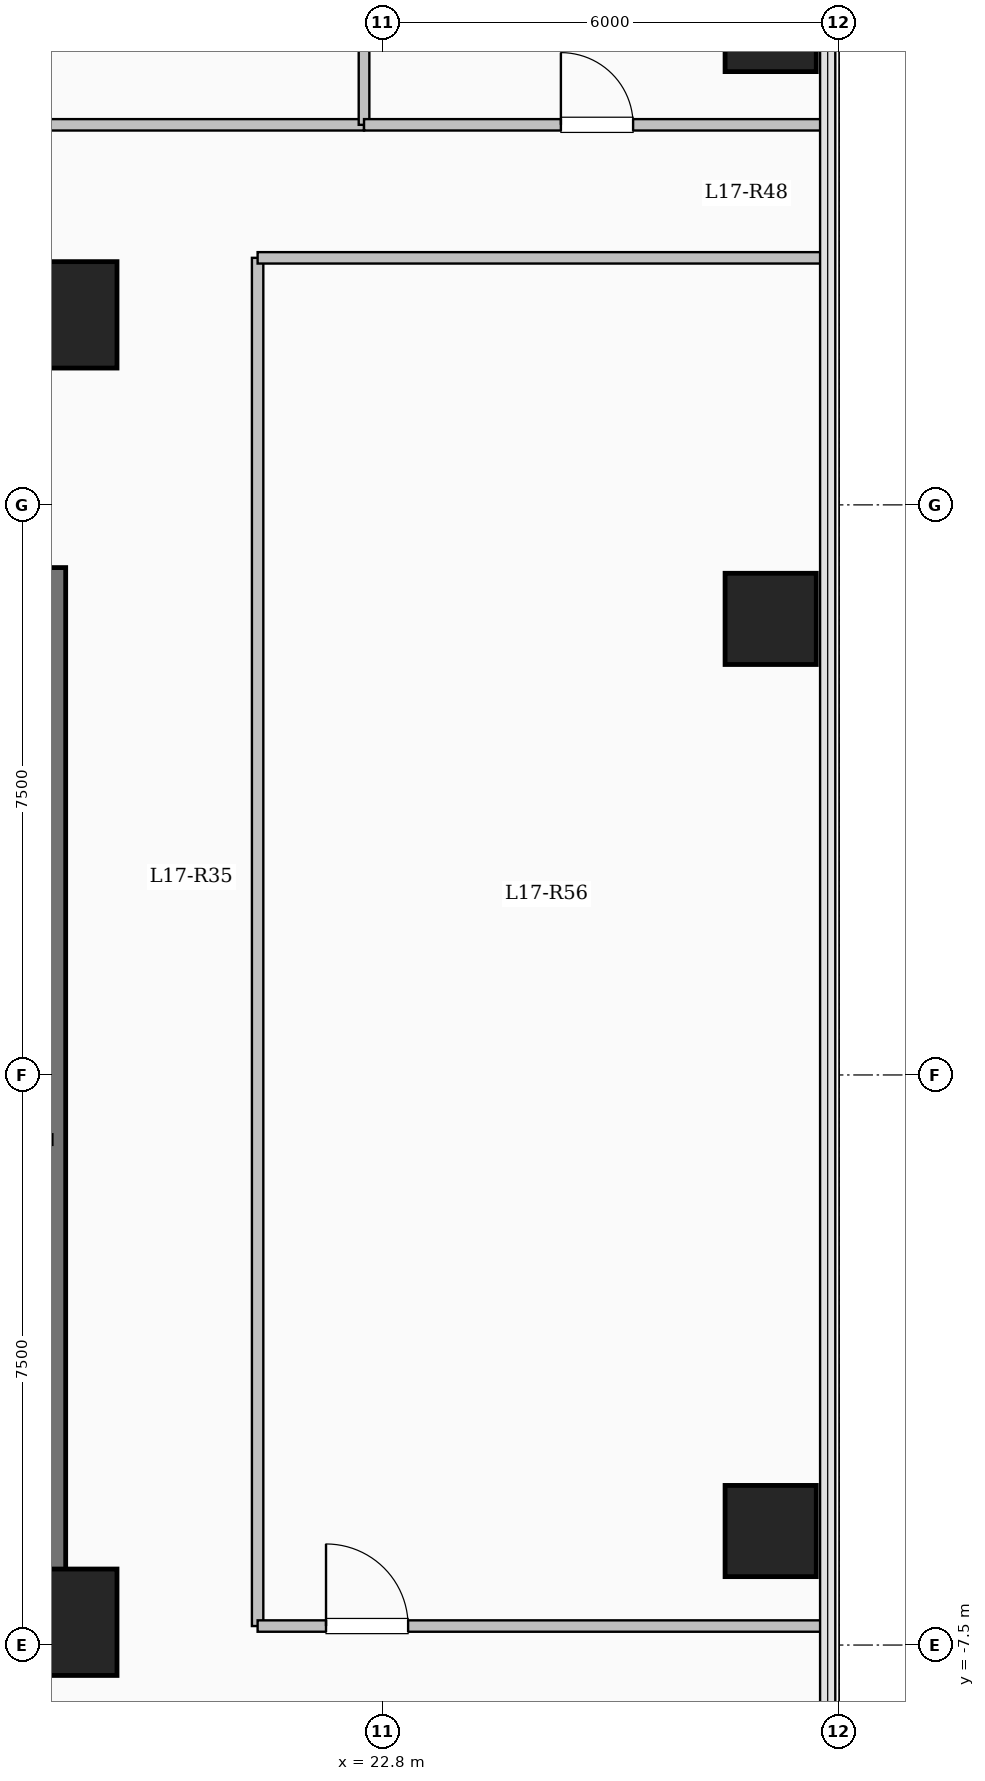
"""IFC4 building model, lengths in metres.
Left out: names, types, materials, properties, quantities, classifications, styles, units other than length and angle.
Written with IfcOpenShell. Run it as: python <this file> out.ifc"""

import sys

from ifc_helpers import new_model, si_unit, direction, frame, frame_2d, origin, origin_2d, place, context, subcontext, project, spatial, rectangle, extrude, element, fill, save


model = new_model("IFC4")
c1 = context("Model", 3, precision=1e-05, world=origin(), true_north=direction((0.0, 1.0)))
c2 = subcontext(c1, "Body", "Model", "MODEL_VIEW")
j1 = project(units=[si_unit("LENGTHUNIT", "METRE"), si_unit("PLANEANGLEUNIT", "RADIAN")], contexts=[c1])
p1 = place(None, origin())
s1 = spatial("IfcSite", under=j1, at=p1, CompositionType="ELEMENT")
p2 = place(p1, origin())
s2 = spatial("IfcBuilding", under=s1, at=p2, CompositionType="ELEMENT")
p3 = place(p2, frame((0.0, 0.0, 64.2)))
s3 = spatial("IfcBuildingStorey", under=s2, at=p3, CompositionType="ELEMENT", Elevation=64.2)
for number, where, z_axis, x_axis in (
    (1, (18.6, -7.2, 0.0), (0.0, 0.0, 1.0), (1.0, 0.0, 0.0)),
    (2, (18.6, 10.0, 0.0), (0.0, 0.0, 1.0), (1.0, 0.0, 0.0)),
):
    element("IfcColumn", number, at=place(p3, frame(where, z_axis=z_axis, x_axis=x_axis)), inside=s3, PredefinedType="COLUMN", context=c2, shape_type="SweptSolid", body=[
        extrude(rectangle(XDim=1.4, YDim=1.4, at=origin_2d()), origin(), (0.0, 0.0, 1.0), 4.5),
    ])
for number, where, z_axis, x_axis in (
    (3, (27.9, -6.0, 0.0), (0.0, 0.0, 1.0), (1.0, 0.0, 0.0)),
    (4, (27.9, 6.0, 0.0), (0.0, 0.0, 1.0), (1.0, 0.0, 0.0)),
    (5, (27.9, 13.8, 0.0), (0.0, 0.0, 1.0), (1.0, 0.0, 0.0)),
):
    element("IfcColumn", number, at=place(p3, frame(where, z_axis=z_axis, x_axis=x_axis)), inside=s3, PredefinedType="COLUMN", context=c2, shape_type="SweptSolid", body=[
        extrude(rectangle(XDim=1.2, YDim=1.2, at=origin_2d()), origin(), (0.0, 0.0, 1.0), 4.5),
    ])
p4 = place(p3, frame((18.45, -7.375, 0.0), z_axis=(0.0, 0.0, 1.0), x_axis=(0.0, 1.0, 0.0)))
e6 = element("IfcWall", 6, at=p4, inside=s3, PredefinedType="SHEAR", context=c2, shape_type="SweptSolid", body=[
    extrude(rectangle(XDim=14.05, YDim=0.35, at=frame_2d((7.025, 0.0))), origin(), (0.0, 0.0, 1.0), 4.5),
])
p5 = place(p3, frame((10.075, -7.2, 0.0), z_axis=(0.0, 0.0, 1.0), x_axis=(1.0, 0.0, 0.0)))
e7 = element("IfcWall", 7, at=p5, inside=s3, PredefinedType="SHEAR", context=c2, shape_type="SweptSolid", body=[
    extrude(rectangle(XDim=8.55, YDim=0.35, at=frame_2d((4.275, 0.0))), origin(), (0.0, 0.0, 1.0), 4.5),
])
p6 = place(p3, frame((3.85, 12.5, 0.0), z_axis=(0.0, 0.0, 1.0), x_axis=(1.0, 0.0, 0.0)))
e8 = element("IfcWall", 8, at=p6, inside=s3, PredefinedType="PARTITIONING", context=c2, shape_type="SweptSolid", body=[
    extrude(rectangle(XDim=18.7, YDim=0.15, at=frame_2d((9.35, 0.0))), origin(), (0.0, 0.0, 1.0), 4.2),
])
p7 = place(p6, frame((0.8, 0.0, 0.0)))
e9 = element("IfcOpeningElement", 9, at=p7, cuts=e8, PredefinedType="OPENING", context=c2, shape_type="SweptSolid", body=[
    extrude(rectangle(XDim=0.95, YDim=2.15, at=frame_2d((0.475, 1.075))), frame((0.0, 0.085, 0.0), z_axis=(0.0, -1.0, 0.0), x_axis=(1.0, 0.0, 0.0)), (0.0, 0.0, 1.0), 0.17),
])
p8 = place(p6, frame((3.6, 0.0, 0.0)))
e10 = element("IfcOpeningElement", 10, at=p8, cuts=e8, PredefinedType="OPENING", context=c2, shape_type="SweptSolid", body=[
    extrude(rectangle(XDim=0.95, YDim=2.15, at=frame_2d((0.475, 1.075))), frame((0.0, 0.085, 0.0), z_axis=(0.0, -1.0, 0.0), x_axis=(1.0, 0.0, 0.0)), (0.0, 0.0, 1.0), 0.17),
])
p9 = place(p6, frame((6.55, 0.0, 0.0)))
e11 = element("IfcOpeningElement", 11, at=p9, cuts=e8, PredefinedType="OPENING", context=c2, shape_type="SweptSolid", body=[
    extrude(rectangle(XDim=1.08, YDim=2.15, at=frame_2d((0.54, 1.075))), frame((0.0, 0.085, 0.0), z_axis=(0.0, -1.0, 0.0), x_axis=(1.0, 0.0, 0.0)), (0.0, 0.0, 1.0), 0.17),
])
p10 = place(p6, frame((11.317, 0.0, 0.0)))
e12 = element("IfcOpeningElement", 12, at=p10, cuts=e8, PredefinedType="OPENING", context=c2, shape_type="SweptSolid", body=[
    extrude(rectangle(XDim=1.2, YDim=2.15, at=frame_2d((0.6, 1.075))), frame((0.0, 0.085, 0.0), z_axis=(0.0, -1.0, 0.0), x_axis=(1.0, 0.0, 0.0)), (0.0, 0.0, 1.0), 0.17),
])
p11 = place(p3, frame((21.15, -7.25, 0.0), z_axis=(0.0, 0.0, 1.0), x_axis=(0.0, 1.0, 0.0)))
e13 = element("IfcWall", 13, at=p11, inside=s3, PredefinedType="PARTITIONING", context=c2, shape_type="SweptSolid", body=[
    extrude(rectangle(XDim=18.0, YDim=0.15, at=frame_2d((9.0, 0.0))), origin(), (0.0, 0.0, 1.0), 3.635),
])
p12 = place(p3, frame((21.15, -7.25, 0.0), z_axis=(0.0, 0.0, 1.0), x_axis=(1.0, 0.0, 0.0)))
e14 = element("IfcWall", 14, at=p12, inside=s3, PredefinedType="PARTITIONING", context=c2, shape_type="SweptSolid", body=[
    extrude(rectangle(XDim=7.53, YDim=0.15, at=frame_2d((3.765, 0.0))), origin(), (0.0, 0.0, 1.0), 4.2),
])
p13 = place(p12, frame((0.9, 0.0, 0.0)))
e15 = element("IfcOpeningElement", 15, at=p13, cuts=e14, PredefinedType="OPENING", context=c2, shape_type="SweptSolid", body=[
    extrude(rectangle(XDim=1.08, YDim=2.15, at=frame_2d((0.54, 1.075))), frame((0.0, 0.085, 0.0), z_axis=(0.0, -1.0, 0.0), x_axis=(1.0, 0.0, 0.0)), (0.0, 0.0, 1.0), 0.17),
])
p14 = place(p3, frame((21.15, 10.75, 0.0), z_axis=(0.0, 0.0, 1.0), x_axis=(1.0, 0.0, 0.0)))
e16 = element("IfcWall", 16, at=p14, inside=s3, PredefinedType="PARTITIONING", context=c2, shape_type="SweptSolid", body=[
    extrude(rectangle(XDim=7.53, YDim=0.15, at=frame_2d((3.765, 0.0))), origin(), (0.0, 0.0, 1.0), 4.2),
])
p15 = place(p3, frame((22.55, 12.5, 0.0), z_axis=(0.0, 0.0, 1.0), x_axis=(0.0, 1.0, 0.0)))
e17 = element("IfcWall", 17, at=p15, inside=s3, PredefinedType="PARTITIONING", context=c2, shape_type="SweptSolid", body=[
    extrude(rectangle(XDim=6.55, YDim=0.14, at=frame_2d((3.275, 0.0))), origin(), (0.0, 0.0, 1.0), 4.2),
])
p16 = place(p3, frame((22.55, 12.5, 0.0), z_axis=(0.0, 0.0, 1.0), x_axis=(1.0, 0.0, 0.0)))
e18 = element("IfcWall", 18, at=p16, inside=s3, PredefinedType="PARTITIONING", context=c2, shape_type="SweptSolid", body=[
    extrude(rectangle(XDim=6.13, YDim=0.15, at=frame_2d((3.065, 0.0))), origin(), (0.0, 0.0, 1.0), 4.2),
])
p17 = place(p16, frame((2.59, 0.0, 0.0)))
e19 = element("IfcOpeningElement", 19, at=p17, cuts=e18, PredefinedType="OPENING", context=c2, shape_type="SweptSolid", body=[
    extrude(rectangle(XDim=0.95, YDim=2.15, at=frame_2d((0.475, 1.075))), frame((0.0, 0.085, 0.0), z_axis=(0.0, -1.0, 0.0), x_axis=(1.0, 0.0, 0.0)), (0.0, 0.0, 1.0), 0.17),
])
p18 = place(p17, origin())
e20 = element("IfcDoor", 20, at=p18, inside=s3, OperationType="SINGLE_SWING_LEFT", PredefinedType="DOOR", context=c2, shape_type="SweptSolid", body=[
    extrude(rectangle(XDim=0.95, YDim=2.15, at=frame_2d((0.475, 1.075))), frame((0.0, 0.025, 0.0), z_axis=(0.0, -1.0, 0.0), x_axis=(1.0, 0.0, 0.0)), (0.0, 0.0, 1.0), 0.05),
])
fill(e19, e20)
p19 = place(p13, origin())
e21 = element("IfcDoor", 21, at=p19, inside=s3, OperationType="SINGLE_SWING_LEFT", PredefinedType="DOOR", context=c2, shape_type="SweptSolid", body=[
    extrude(rectangle(XDim=1.08, YDim=2.15, at=frame_2d((0.54, 1.075))), frame((0.0, 0.025, 0.0), z_axis=(0.0, -1.0, 0.0), x_axis=(1.0, 0.0, 0.0)), (0.0, 0.0, 1.0), 0.05),
])
fill(e15, e21)
save(model, sys.argv[1])
